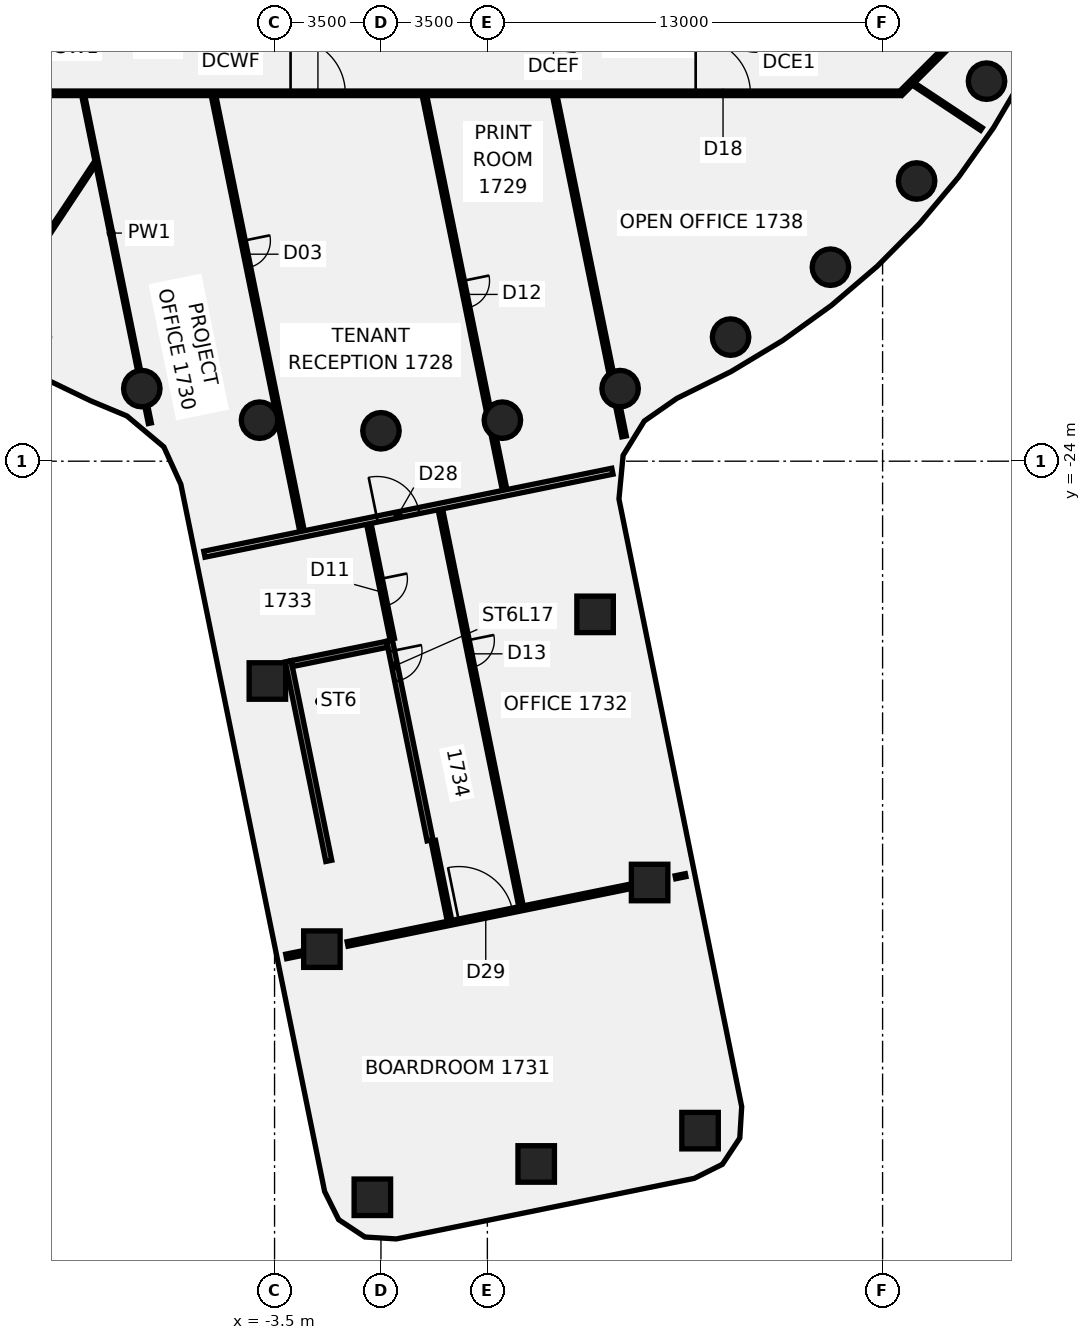
"""IFC4 building model, lengths in metres.
Left out: names, types, materials, properties, quantities, classifications, styles, units other than length and angle.
Written with IfcOpenShell. Run it as: python <this file> out.ifc"""

import sys

from ifc_helpers import new_model, si_unit, direction, frame, frame_2d, origin, origin_2d, place, context, subcontext, project, spatial, polyline, rectangle, circle, outline, extrude, element, fill, save


model = new_model("IFC4")
c1 = context("Model", 3, precision=1e-05, world=origin(), true_north=direction((0.0, 1.0)))
c2 = subcontext(c1, "Body", "Model", "MODEL_VIEW")
j1 = project(units=[si_unit("LENGTHUNIT", "METRE"), si_unit("PLANEANGLEUNIT", "RADIAN")], contexts=[c1])
p1 = place(None, origin())
s1 = spatial("IfcSite", under=j1, at=p1, CompositionType="ELEMENT")
p2 = place(p1, origin())
s2 = spatial("IfcBuilding", under=s1, at=p2, CompositionType="ELEMENT")
p3 = place(p2, frame((0.0, 0.0, 75.25)))
s3 = spatial("IfcBuildingStorey", under=s2, at=p3, CompositionType="ELEMENT", Elevation=75.25)
for number, where, z_axis, x_axis in (
    (1, (-7.866, -21.613, -0.14), (0.0, 0.0, 1.0), (1.0, 0.0, 0.0)),
    (2, (-3.994, -22.651, -0.14), (0.0, 0.0, 1.0), (1.0, 0.0, 0.0)),
    (3, (0.0, -23.0, -0.14), (0.0, 0.0, 1.0), (1.0, 0.0, 0.0)),
    (4, (3.994, -22.651, -0.14), (0.0, 0.0, 1.0), (1.0, 0.0, 0.0)),
    (5, (7.866, -21.613, -0.14), (0.0, 0.0, 1.0), (1.0, 0.0, 0.0)),
    (6, (11.5, -19.919, -0.14), (0.0, 0.0, 1.0), (1.0, 0.0, 0.0)),
    (7, (14.784, -17.619, -0.14), (0.0, 0.0, 1.0), (1.0, 0.0, 0.0)),
    (8, (17.619, -14.784, -0.14), (0.0, 0.0, 1.0), (1.0, 0.0, 0.0)),
    (9, (19.919, -11.5, -0.14), (0.0, 0.0, 1.0), (1.0, 0.0, 0.0)),
):
    element("IfcColumn", number, at=place(p3, frame(where, z_axis=z_axis, x_axis=x_axis)), inside=s3, PredefinedType="COLUMN", context=c2, shape_type="SweptSolid", body=[
        extrude(circle(Radius=0.6, at=origin_2d()), origin(), (0.0, 0.0, 1.0), 3.71),
    ])
p4 = place(p3, frame((8.837, -37.857, -0.138), z_axis=(0.07725535249, 0.043948835728, 0.996042223176), x_axis=(-0.97674033462, -0.197093187203, 0.084454687756)))
e10 = element("IfcColumn", 10, at=p4, inside=s3, PredefinedType="COLUMN", context=c2, shape_type="SweptSolid", body=[
    extrude(rectangle(XDim=1.2, YDim=1.2, at=origin_2d()), origin(), (0.0, 0.0, 1.0), 3.716),
])
p5 = place(p3, frame((-1.943, -40.049, -0.138), z_axis=(0.088440845648, -0.008673247864, 0.996043669521), x_axis=(-0.198432607845, 0.979765603585, 0.026150758614)))
e11 = element("IfcColumn", 11, at=p5, inside=s3, PredefinedType="COLUMN", context=c2, shape_type="SweptSolid", body=[
    extrude(rectangle(XDim=1.2, YDim=1.2, at=origin_2d()), origin(), (0.0, 0.0, 1.0), 3.716),
])
p6 = place(p3, frame((7.043, -29.038, -0.139), z_axis=(0.034232693176, 0.034891014198, 0.998804655499), x_axis=(-0.979256198152, -0.198537646121, 0.040498166061)))
e12 = element("IfcColumn", 12, at=p6, inside=s3, PredefinedType="COLUMN", context=c2, shape_type="SweptSolid", body=[
    extrude(rectangle(XDim=1.2, YDim=1.2, at=origin_2d()), origin(), (0.0, 0.0, 1.0), 3.708),
])
p7 = place(p3, frame((-3.736, -31.229, -0.139), z_axis=(0.045427257265, -0.017907556487, 0.99880713039), x_axis=(-0.198653368973, 0.979708767156, 0.026600198356)))
e13 = element("IfcColumn", 13, at=p7, inside=s3, PredefinedType="COLUMN", context=c2, shape_type="SweptSolid", body=[
    extrude(rectangle(XDim=1.2, YDim=1.2, at=origin_2d()), origin(), (0.0, 0.0, 1.0), 3.708),
])
p8 = place(p3, frame((-0.283, -48.21, -0.138), z_axis=(0.127200295059, 0.002356773352, 0.991874251383), x_axis=(-0.197697779503, 0.979992577374, 0.023024688323)))
e14 = element("IfcColumn", 14, at=p8, inside=s3, PredefinedType="COLUMN", context=c2, shape_type="SweptSolid", body=[
    extrude(rectangle(XDim=1.2, YDim=1.2, at=origin_2d()), origin(), (0.0, 0.0, 1.0), 3.729),
])
p9 = place(p3, frame((5.106, -47.114, -0.138), z_axis=(0.121695461927, 0.028607271039, 0.992155148447), x_axis=(-0.972318457177, -0.197441138054, 0.124955251334)))
e15 = element("IfcColumn", 15, at=p9, inside=s3, PredefinedType="COLUMN", context=c2, shape_type="SweptSolid", body=[
    extrude(rectangle(XDim=1.2, YDim=1.2, at=origin_2d()), origin(), (0.0, 0.0, 1.0), 3.729),
])
p10 = place(p3, frame((10.496, -46.018, -0.138), z_axis=(0.116046339335, 0.054848749218, 0.991728219744), x_axis=(-0.972644227532, -0.1960216138, 0.124654456691)))
e16 = element("IfcColumn", 16, at=p10, inside=s3, PredefinedType="COLUMN", context=c2, shape_type="SweptSolid", body=[
    extrude(rectangle(XDim=1.2, YDim=1.2, at=origin_2d()), origin(), (0.0, 0.0, 1.0), 3.73),
])
p11 = place(p3, frame((-9.795, -11.969, 0.0), z_axis=(0.0, 0.0, 1.0), x_axis=(0.199208554459, -0.979957117342, 0.0)))
e17 = element("IfcWall", 17, at=p11, inside=s3, PredefinedType="PARTITIONING", context=c2, shape_type="SweptSolid", body=[
    extrude(rectangle(XDim=9.243, YDim=0.1, at=frame_2d((4.622, 0.0))), origin(), (0.0, 0.0, 1.0), 2.97),
])
p12 = place(p3, frame((-7.719, -22.183, 0.0), z_axis=(0.0, 0.0, 1.0), x_axis=(0.1988702456, -0.980025828953, 0.0)))
e18 = element("IfcWall", 18, at=p12, inside=s3, PredefinedType="PARTITIONING", context=c2, shape_type="SweptSolid", body=[
    extrude(rectangle(XDim=0.579, YDim=0.1, at=frame_2d((0.29, 0.0))), origin(), (0.0, 0.0, 1.0), 2.97),
])
p13 = place(p3, frame((-5.508, -11.973, 0.0), z_axis=(0.0, 0.0, 1.0), x_axis=(0.199216758513, -0.979955449563, 0.0)))
e19 = element("IfcWall", 19, at=p13, inside=s3, PredefinedType="PARTITIONING", context=c2, shape_type="SweptSolid", body=[
    extrude(rectangle(XDim=14.623, YDim=0.15, at=frame_2d((7.312, 0.0))), origin(), (0.0, 0.0, 1.0), 2.87),
])
p14 = place(p13, frame((4.875, 0.0, 0.0)))
e20 = element("IfcOpeningElement", 20, at=p14, cuts=e19, PredefinedType="OPENING", context=c2, shape_type="SweptSolid", body=[
    extrude(rectangle(XDim=0.9, YDim=2.1, at=frame_2d((0.45, 1.05))), frame((0.0, 0.085, 0.0), z_axis=(0.0, -1.0, 0.0), x_axis=(1.0, 0.0, 0.0)), (0.0, 0.0, 1.0), 0.17),
])
p15 = place(p3, frame((-0.399, -26.061, 0.0), z_axis=(0.0, 0.0, 1.0), x_axis=(0.199301945462, -0.979938127912, 0.0)))
e21 = element("IfcWall", 21, at=p15, inside=s3, PredefinedType="PARTITIONING", context=c2, shape_type="SweptSolid", body=[
    extrude(rectangle(XDim=3.86, YDim=0.15, at=frame_2d((1.93, 0.0))), origin(), (0.0, 0.0, 1.0), 2.87),
])
p16 = place(p15, frame((1.85, 0.0, 0.0)))
e22 = element("IfcOpeningElement", 22, at=p16, cuts=e21, PredefinedType="OPENING", context=c2, shape_type="SweptSolid", body=[
    extrude(rectangle(XDim=0.9, YDim=2.1, at=frame_2d((0.45, 1.05))), frame((0.0, 0.085, 0.0), z_axis=(0.0, -1.0, 0.0), x_axis=(1.0, 0.0, 0.0)), (0.0, 0.0, 1.0), 0.17),
])
p17 = place(p3, frame((1.721, -36.487, 0.0), z_axis=(0.0, 0.0, 1.0), x_axis=(0.199315071398, -0.979935458239, 0.0)))
e23 = element("IfcWall", 23, at=p17, inside=s3, PredefinedType="PARTITIONING", context=c2, shape_type="SweptSolid", body=[
    extrude(rectangle(XDim=2.685, YDim=0.15, at=frame_2d((1.343, 0.0))), origin(), (0.0, 0.0, 1.0), 2.87),
])
p18 = place(p3, frame((1.431, -11.973, 0.0), z_axis=(0.0, 0.0, 1.0), x_axis=(0.199256654884, -0.979947338118, 0.0)))
e24 = element("IfcWall", 24, at=p18, inside=s3, PredefinedType="PARTITIONING", context=c2, shape_type="SweptSolid", body=[
    extrude(rectangle(XDim=10.521, YDim=0.15, at=frame_2d((5.261, 0.0))), origin(), (0.0, 0.0, 1.0), 2.97),
])
p19 = place(p18, frame((6.225, 0.0, 0.0)))
e25 = element("IfcOpeningElement", 25, at=p19, cuts=e24, PredefinedType="OPENING", context=c2, shape_type="SweptSolid", body=[
    extrude(rectangle(XDim=0.9, YDim=2.1, at=frame_2d((0.45, 1.05))), frame((0.0, 0.085, 0.0), z_axis=(0.0, -1.0, 0.0), x_axis=(1.0, 0.0, 0.0)), (0.0, 0.0, 1.0), 0.17),
])
p20 = place(p3, frame((3.71, -23.185, 0.0), z_axis=(0.0, 0.0, 1.0), x_axis=(0.199298110967, -0.979938907772, 0.0)))
e26 = element("IfcWall", 26, at=p20, inside=s3, PredefinedType="PARTITIONING", context=c2, shape_type="SweptSolid", body=[
    extrude(rectangle(XDim=1.8, YDim=0.15, at=frame_2d((0.9, 0.0))), origin(), (0.0, 0.0, 1.0), 2.87),
])
p21 = place(p3, frame((1.953, -25.583, 0.0), z_axis=(0.0, 0.0, 1.0), x_axis=(0.199276932298, -0.979943214811, 0.0)))
e27 = element("IfcWall", 27, at=p21, inside=s3, PredefinedType="PARTITIONING", context=c2, shape_type="SweptSolid", body=[
    extrude(rectangle(XDim=13.32, YDim=0.15, at=frame_2d((6.66, 0.0))), origin(), (0.0, 0.0, 1.0), 2.87),
])
p22 = place(p21, frame((4.4, 0.0, 0.0)))
e28 = element("IfcOpeningElement", 28, at=p22, cuts=e27, PredefinedType="OPENING", context=c2, shape_type="SweptSolid", body=[
    extrude(rectangle(XDim=0.9, YDim=2.1, at=frame_2d((0.45, 1.05))), frame((0.0, 0.085, 0.0), z_axis=(0.0, -1.0, 0.0), x_axis=(1.0, 0.0, 0.0)), (0.0, 0.0, 1.0), 0.17),
])
p23 = place(p3, frame((5.717, -11.973, 0.0), z_axis=(0.0, 0.0, 1.0), x_axis=(0.199292052779, -0.979940139855, 0.0)))
e29 = element("IfcWall", 29, at=p23, inside=s3, PredefinedType="PARTITIONING", context=c2, shape_type="SweptSolid", body=[
    extrude(rectangle(XDim=9.296, YDim=0.15, at=frame_2d((4.648, 0.0))), origin(), (0.0, 0.0, 1.0), 2.97),
])
p24 = place(p3, frame((7.797, -22.204, 0.0), z_axis=(0.0, 0.0, 1.0), x_axis=(0.199166137736, -0.979965738982, 0.0)))
e30 = element("IfcWall", 30, at=p24, inside=s3, PredefinedType="PARTITIONING", context=c2, shape_type="SweptSolid", body=[
    extrude(rectangle(XDim=1.0, YDim=0.15, at=frame_2d((0.5, 0.0))), origin(), (0.0, 0.0, 1.0), 2.97),
])
p25 = place(p3, frame((17.52, -11.598, 0.0), z_axis=(0.0, 0.0, 1.0), x_axis=(0.833801234366, -0.552064762115, 0.0)))
e31 = element("IfcWall", 31, at=p25, inside=s3, PredefinedType="PARTITIONING", context=c2, shape_type="SweptSolid", body=[
    extrude(rectangle(XDim=2.675, YDim=0.1, at=frame_2d((1.337, 0.0))), origin(), (0.0, 0.0, 1.0), 2.97),
])
p26 = place(p3, frame((-17.1, -11.9, 0.0), z_axis=(0.0, 0.0, 1.0), x_axis=(1.0, 0.0, 0.0)))
e32 = element("IfcWall", 32, at=p26, inside=s3, PredefinedType="PARTITIONING", context=c2, shape_type="SweptSolid", body=[
    extrude(rectangle(XDim=34.165, YDim=0.15, at=frame_2d((17.083, 0.0))), origin(), (0.0, 0.0, 1.0), 2.97),
])
p27 = place(p26, frame((14.127, 0.0, 0.0)))
e33 = element("IfcOpeningElement", 33, at=p27, cuts=e32, PredefinedType="OPENING", context=c2, shape_type="SweptSolid", body=[
    extrude(rectangle(XDim=1.8, YDim=2.1, at=frame_2d((0.9, 1.05))), frame((0.0, 0.085, 0.0), z_axis=(0.0, -1.0, 0.0), x_axis=(1.0, 0.0, 0.0)), (0.0, 0.0, 1.0), 0.17),
])
p28 = place(p26, frame((3.6, 0.0, 0.0)))
e34 = element("IfcOpeningElement", 34, at=p28, cuts=e32, PredefinedType="OPENING", context=c2, shape_type="SweptSolid", body=[
    extrude(rectangle(XDim=1.8, YDim=2.1, at=frame_2d((0.9, 1.05))), frame((0.0, 0.085, 0.0), z_axis=(0.0, -1.0, 0.0), x_axis=(1.0, 0.0, 0.0)), (0.0, 0.0, 1.0), 0.17),
])
p29 = place(p26, frame((27.452, 0.0, 0.0)))
e35 = element("IfcOpeningElement", 35, at=p29, cuts=e32, PredefinedType="OPENING", context=c2, shape_type="SweptSolid", body=[
    extrude(rectangle(XDim=1.8, YDim=2.1, at=frame_2d((0.9, 1.05))), frame((0.0, 0.085, 0.0), z_axis=(0.0, -1.0, 0.0), x_axis=(1.0, 0.0, 0.0)), (0.0, 0.0, 1.0), 0.17),
])
p30 = place(p3, frame((-5.808, -27.059, 0.0), z_axis=(0.0, 0.0, 1.0), x_axis=(0.979948993984, 0.199248511138, 0.0)))
e36 = element("IfcWall", 36, at=p30, inside=s3, PredefinedType="PARTITIONING", context=c2, shape_type="SweptSolid", body=[
    extrude(rectangle(XDim=13.695, YDim=0.2, at=frame_2d((6.848, 0.0))), origin(), (0.0, 0.0, 1.0), 2.87),
])
p31 = place(p30, frame((5.799, 0.0, 0.0)))
e37 = element("IfcOpeningElement", 37, at=p31, cuts=e36, PredefinedType="OPENING", context=c2, shape_type="SweptSolid", body=[
    extrude(rectangle(XDim=1.4, YDim=2.1, at=frame_2d((0.7, 1.05))), frame((0.0, 0.11, 0.0), z_axis=(0.0, -1.0, 0.0), x_axis=(1.0, 0.0, 0.0)), (0.0, 0.0, 1.0), 0.22),
])
p32 = place(p3, frame((-3.118, -40.288, 0.0), z_axis=(0.0, 0.0, 1.0), x_axis=(0.979937909442, 0.199303019644, 0.0)))
e38 = element("IfcWall", 38, at=p32, inside=s3, PredefinedType="PARTITIONING", context=c2, shape_type="SweptSolid", body=[
    extrude(rectangle(XDim=0.648, YDim=0.15, at=frame_2d((0.324, 0.0))), origin(), (0.0, 0.0, 1.0), 2.97),
])
p33 = place(p3, frame((-1.098, -39.877, 0.0), z_axis=(0.0, 0.0, 1.0), x_axis=(0.979946181894, 0.199262341126, 0.0)))
e39 = element("IfcWall", 39, at=p33, inside=s3, PredefinedType="PARTITIONING", context=c2, shape_type="SweptSolid", body=[
    extrude(rectangle(XDim=9.592, YDim=0.15, at=frame_2d((4.796, 0.0))), origin(), (0.0, 0.0, 1.0), 2.87),
])
p34 = place(p33, frame((3.738, 0.0, 0.0)))
e40 = element("IfcOpeningElement", 40, at=p34, cuts=e39, PredefinedType="OPENING", context=c2, shape_type="SweptSolid", body=[
    extrude(rectangle(XDim=1.8, YDim=2.1, at=frame_2d((0.9, 1.05))), frame((0.0, 0.085, 0.0), z_axis=(0.0, -1.0, 0.0), x_axis=(1.0, 0.0, 0.0)), (0.0, 0.0, 1.0), 0.17),
])
p35 = place(p3, frame((9.686, -37.684, 0.0), z_axis=(0.0, 0.0, 1.0), x_axis=(0.979943754842, 0.199274276677, 0.0)))
e41 = element("IfcWall", 41, at=p35, inside=s3, PredefinedType="PARTITIONING", context=c2, shape_type="SweptSolid", body=[
    extrude(rectangle(XDim=0.342, YDim=0.1, at=frame_2d((0.171, 0.0))), origin(), (0.0, 0.0, 1.0), 2.97),
])
p36 = place(p3, frame((17.1, -11.9, 0.0), z_axis=(0.0, 0.0, 1.0), x_axis=(0.707106781187, 0.707106781187, 0.0)))
e42 = element("IfcWall", 42, at=p36, inside=s3, PredefinedType="PARTITIONING", context=c2, shape_type="SweptSolid", body=[
    extrude(rectangle(XDim=2.505, YDim=0.15, at=frame_2d((1.253, 0.0))), origin(), (0.0, 0.0, 1.0), 2.97),
])
p37 = place(p3, frame((-13.076, -19.75, 0.0), z_axis=(0.0, 0.0, 1.0), x_axis=(0.552134654266, 0.833754954144, 0.0)))
e43 = element("IfcWall", 43, at=p37, inside=s3, PredefinedType="PARTITIONING", context=c2, shape_type="SweptSolid", body=[
    extrude(rectangle(XDim=6.639, YDim=0.1, at=frame_2d((3.319, 0.0))), origin(), (0.0, 0.0, 1.0), 2.97),
])
p38 = place(p3, frame((0.28, -29.903, -0.14), z_axis=(0.0, 0.0, 1.0), x_axis=(0.199212479042, -0.979956319534, 0.0)))
e44 = element("IfcWall", 44, at=p38, inside=s3, PredefinedType="SHEAR", context=c2, shape_type="SweptSolid", body=[
    extrude(rectangle(XDim=6.7, YDim=0.2, at=frame_2d((3.35, 0.0))), origin(), (0.0, 0.0, 1.0), 3.01),
])
p39 = place(p38, frame((0.35, 0.0, 0.0)))
e45 = element("IfcOpeningElement", 45, at=p39, cuts=e44, PredefinedType="OPENING", context=c2, shape_type="SweptSolid", body=[
    extrude(rectangle(XDim=1.0, YDim=2.1, at=frame_2d((0.5, 1.05))), frame((0.0, 0.11, 0.0), z_axis=(0.0, -1.0, 0.0), x_axis=(1.0, 0.0, 0.0)), (0.0, 0.0, 1.0), 0.22),
])
p40 = place(p3, frame((-3.052, -30.58, -0.14), z_axis=(0.0, 0.0, 1.0), x_axis=(0.199247471639, -0.979949205339, 0.0)))
e46 = element("IfcWall", 46, at=p40, inside=s3, PredefinedType="SHEAR", context=c2, shape_type="SweptSolid", body=[
    extrude(rectangle(XDim=6.7, YDim=0.2, at=frame_2d((3.35, 0.0))), origin(), (0.0, 0.0, 1.0), 3.01),
])
p41 = place(p3, frame((-2.934, -30.658, -0.14), z_axis=(0.0, 0.0, 1.0), x_axis=(0.97994171326, 0.199284316026, 0.0)))
e47 = element("IfcWall", 47, at=p41, inside=s3, PredefinedType="SHEAR", context=c2, shape_type="SweptSolid", body=[
    extrude(rectangle(XDim=3.2, YDim=0.2, at=frame_2d((1.6, 0.0))), origin(), (0.0, 0.0, 1.0), 3.01),
])
p42 = place(p3, frame((0.0, 0.0, -0.14)))
e48 = element("IfcWall", 48, at=p42, inside=s3, PredefinedType="SHEAR", context=c2, shape_type="SweptSolid", body=[
    extrude(outline(polyline([(-1.659, -36.93), (-1.619, -37.126), (1.517, -36.488), (1.477, -36.292), (-1.659, -36.93)])), origin(), (0.0, 0.0, 1.0), 3.01),
])
p43 = place(p14, frame((0.9, 0.0, 0.0), z_axis=(0.0, 0.0, 1.0), x_axis=(-1.0, 0.0, 0.0)))
e49 = element("IfcDoor", 49, at=p43, inside=s3, OperationType="SINGLE_SWING_LEFT", PredefinedType="DOOR", context=c2, shape_type="SweptSolid", body=[
    extrude(rectangle(XDim=0.9, YDim=2.1, at=frame_2d((0.45, 1.05))), frame((0.0, 0.025, 0.0), z_axis=(0.0, -1.0, 0.0), x_axis=(1.0, 0.0, 0.0)), (0.0, 0.0, 1.0), 0.05),
])
fill(e20, e49)
p44 = place(p16, frame((0.9, 0.0, 0.0), z_axis=(0.0, 0.0, 1.0), x_axis=(-1.0, 0.0, 0.0)))
e50 = element("IfcDoor", 50, at=p44, inside=s3, OperationType="SINGLE_SWING_RIGHT", PredefinedType="DOOR", context=c2, shape_type="SweptSolid", body=[
    extrude(rectangle(XDim=0.9, YDim=2.1, at=frame_2d((0.45, 1.05))), frame((0.0, 0.025, 0.0), z_axis=(0.0, -1.0, 0.0), x_axis=(1.0, 0.0, 0.0)), (0.0, 0.0, 1.0), 0.05),
])
fill(e22, e50)
p45 = place(p19, origin())
e51 = element("IfcDoor", 51, at=p45, inside=s3, OperationType="SINGLE_SWING_LEFT", PredefinedType="DOOR", context=c2, shape_type="SweptSolid", body=[
    extrude(rectangle(XDim=0.9, YDim=2.1, at=frame_2d((0.45, 1.05))), frame((0.0, 0.025, 0.0), z_axis=(0.0, -1.0, 0.0), x_axis=(1.0, 0.0, 0.0)), (0.0, 0.0, 1.0), 0.05),
])
fill(e25, e51)
p46 = place(p22, origin())
e52 = element("IfcDoor", 52, at=p46, inside=s3, OperationType="SINGLE_SWING_RIGHT", PredefinedType="DOOR", context=c2, shape_type="SweptSolid", body=[
    extrude(rectangle(XDim=0.9, YDim=2.1, at=frame_2d((0.45, 1.05))), frame((0.0, 0.025, 0.0), z_axis=(0.0, -1.0, 0.0), x_axis=(1.0, 0.0, 0.0)), (0.0, 0.0, 1.0), 0.05),
])
fill(e28, e52)
p47 = place(p27, origin())
e53 = element("IfcDoor", 53, at=p47, inside=s3, OperationType="DOUBLE_DOOR_SINGLE_SWING", PredefinedType="DOOR", context=c2, shape_type="SweptSolid", body=[
    extrude(rectangle(XDim=1.8, YDim=2.1, at=frame_2d((0.9, 1.05))), frame((0.0, 0.025, 0.0), z_axis=(0.0, -1.0, 0.0), x_axis=(1.0, 0.0, 0.0)), (0.0, 0.0, 1.0), 0.05),
])
fill(e33, e53)
p48 = place(p29, frame((1.8, 0.0, 0.0), z_axis=(0.0, 0.0, 1.0), x_axis=(-1.0, 0.0, 0.0)))
e54 = element("IfcDoor", 54, at=p48, inside=s3, OperationType="DOUBLE_DOOR_SINGLE_SWING", PredefinedType="DOOR", context=c2, shape_type="SweptSolid", body=[
    extrude(rectangle(XDim=1.8, YDim=2.1, at=frame_2d((0.9, 1.05))), frame((0.0, 0.025, 0.0), z_axis=(0.0, -1.0, 0.0), x_axis=(1.0, 0.0, 0.0)), (0.0, 0.0, 1.0), 0.05),
])
fill(e35, e54)
p49 = place(p31, origin())
e55 = element("IfcDoor", 55, at=p49, inside=s3, OperationType="DOUBLE_DOOR_SINGLE_SWING", PredefinedType="DOOR", context=c2, shape_type="SweptSolid", body=[
    extrude(rectangle(XDim=1.4, YDim=2.1, at=frame_2d((0.7, 1.05))), frame((0.0, 0.025, 0.0), z_axis=(0.0, -1.0, 0.0), x_axis=(1.0, 0.0, 0.0)), (0.0, 0.0, 1.0), 0.05),
])
fill(e37, e55)
p50 = place(p34, origin())
e56 = element("IfcDoor", 56, at=p50, inside=s3, OperationType="DOUBLE_DOOR_SINGLE_SWING", PredefinedType="DOOR", context=c2, shape_type="SweptSolid", body=[
    extrude(rectangle(XDim=1.8, YDim=2.1, at=frame_2d((0.9, 1.05))), frame((0.0, 0.025, 0.0), z_axis=(0.0, -1.0, 0.0), x_axis=(1.0, 0.0, 0.0)), (0.0, 0.0, 1.0), 0.05),
])
fill(e40, e56)
p51 = place(p39, origin())
e57 = element("IfcDoor", 57, at=p51, inside=s3, OperationType="SINGLE_SWING_LEFT", PredefinedType="DOOR", context=c2, shape_type="SweptSolid", body=[
    extrude(rectangle(XDim=1.0, YDim=2.1, at=frame_2d((0.5, 1.05))), frame((0.0, 0.025, 0.0), z_axis=(0.0, -1.0, 0.0), x_axis=(1.0, 0.0, 0.0)), (0.0, 0.0, 1.0), 0.05),
])
fill(e45, e57)
save(model, sys.argv[1])
